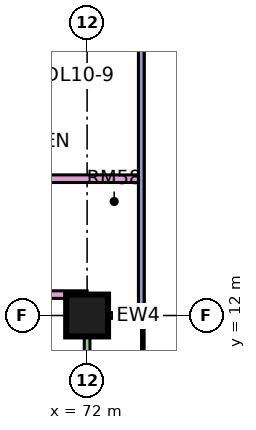
"""IFC4 building model, lengths in metres.
Left out: names, types, materials, properties, quantities, classifications, styles, units other than length and angle.
Written with IfcOpenShell. Run it as: python <this file> out.ifc"""

import sys

from ifc_helpers import new_model, si_unit, direction, frame, frame_2d, origin, origin_2d, place, context, subcontext, project, spatial, rectangle, extrude, element, save


model = new_model("IFC4")
c1 = context("Model", 3, precision=1e-05, world=origin(), true_north=direction((0.0, 1.0)))
c2 = subcontext(c1, "Body", "Model", "MODEL_VIEW")
j1 = project(units=[si_unit("LENGTHUNIT", "METRE"), si_unit("PLANEANGLEUNIT", "RADIAN")], contexts=[c1])
p1 = place(None, origin())
s1 = spatial("IfcSite", under=j1, at=p1, CompositionType="ELEMENT")
p2 = place(p1, origin())
s2 = spatial("IfcBuilding", under=s1, at=p2, CompositionType="ELEMENT")
p3 = place(p2, frame((0.0, 0.0, 52.65)))
s3 = spatial("IfcBuildingStorey", under=s2, at=p3, CompositionType="ELEMENT", Elevation=52.65)
p4 = place(p3, frame((72.0, 12.0, 0.0), z_axis=(0.0, 0.0, 1.0), x_axis=(1.0, 0.0, 0.0)))
e1 = element("IfcColumn", 1, at=p4, inside=s3, PredefinedType="COLUMN", context=c2, shape_type="SweptSolid", body=[
    extrude(rectangle(XDim=1.1, YDim=1.1, at=origin_2d()), origin(), (0.0, 0.0, 1.0), 3.75),
])
p5 = place(p3, frame((72.0, 1.575, 0.0), z_axis=(0.0, 0.0, 1.0), x_axis=(0.0, 1.0, 0.0)))
e2 = element("IfcWall", 2, at=p5, inside=s3, PredefinedType="SOLIDWALL", context=c2, shape_type="SweptSolid", body=[
    extrude(rectangle(XDim=10.35, YDim=0.15, at=frame_2d((5.175, 0.0))), origin(), (0.0, 0.0, 1.0), 3.35),
])
p6 = place(p5, frame((1.288, 0.0, 0.0)))
e3 = element("IfcOpeningElement", 3, at=p6, cuts=e2, PredefinedType="OPENING", context=c2, shape_type="SweptSolid", body=[
    extrude(rectangle(XDim=1.8, YDim=2.4, at=frame_2d((0.9, 1.2))), frame((0.0, 0.085, 0.0), z_axis=(0.0, -1.0, 0.0), x_axis=(1.0, 0.0, 0.0)), (0.0, 0.0, 1.0), 0.17),
])
p7 = place(p5, frame((6.175, 0.0, 0.45)))
e4 = element("IfcOpeningElement", 4, at=p7, cuts=e2, PredefinedType="OPENING", context=c2, shape_type="SweptSolid", body=[
    extrude(rectangle(XDim=3.0, YDim=2.4, at=frame_2d((1.5, 1.2))), frame((0.0, 0.085, 0.0), z_axis=(0.0, -1.0, 0.0), x_axis=(1.0, 0.0, 0.0)), (0.0, 0.0, 1.0), 0.17),
])
p8 = place(p3, frame((73.5, 12.0, 0.0), z_axis=(0.0, 0.0, 1.0), x_axis=(-1.0, 0.0, 0.0)))
e5 = element("IfcWall", 5, at=p8, inside=s3, PredefinedType="SOLIDWALL", context=c2, shape_type="SweptSolid", body=[
    extrude(rectangle(XDim=1.5, YDim=0.15, at=frame_2d((0.75, 0.0))), origin(), (0.0, 0.0, 1.0), 3.35),
])
p9 = place(p3, frame((73.425, 12.075, 0.0), z_axis=(0.0, 0.0, 1.0), x_axis=(0.0, 1.0, 0.0)))
e6 = element("IfcWall", 6, at=p9, inside=s3, PredefinedType="SOLIDWALL", context=c2, shape_type="SweptSolid", body=[
    extrude(rectangle(XDim=10.425, YDim=0.15, at=frame_2d((5.212, 0.0))), origin(), (0.0, 0.0, 1.0), 3.35),
])
p10 = place(p9, frame((8.025, 0.0, 0.45)))
e7 = element("IfcOpeningElement", 7, at=p10, cuts=e6, PredefinedType="OPENING", context=c2, shape_type="SweptSolid", body=[
    extrude(rectangle(XDim=1.8, YDim=2.4, at=frame_2d((0.9, 1.2))), frame((0.0, 0.085, 0.0), z_axis=(0.0, -1.0, 0.0), x_axis=(1.0, 0.0, 0.0)), (0.0, 0.0, 1.0), 0.17),
])
p11 = place(p3, frame((40.65, 12.55, 0.0), z_axis=(0.0, 0.0, 1.0), x_axis=(1.0, 0.0, 0.0)))
e8 = element("IfcWall", 8, at=p11, inside=s3, PredefinedType="PARTITIONING", context=c2, shape_type="SweptSolid", body=[
    extrude(rectangle(XDim=31.35, YDim=0.2, at=frame_2d((15.675, 0.0))), origin(), (0.0, 0.0, 1.0), 3.35),
])
p12 = place(p11, frame((24.0, 0.0, 0.0)))
e9 = element("IfcOpeningElement", 9, at=p12, cuts=e8, PredefinedType="OPENING", context=c2, shape_type="SweptSolid", body=[
    extrude(rectangle(XDim=1.0, YDim=2.1, at=frame_2d((0.5, 1.05))), frame((0.0, 0.11, 0.0), z_axis=(0.0, -1.0, 0.0), x_axis=(1.0, 0.0, 0.0)), (0.0, 0.0, 1.0), 0.22),
])
p13 = place(p11, frame((1.05, 0.0, 0.0)))
e10 = element("IfcOpeningElement", 10, at=p13, cuts=e8, PredefinedType="OPENING", context=c2, shape_type="SweptSolid", body=[
    extrude(rectangle(XDim=1.0, YDim=2.1, at=frame_2d((0.5, 1.05))), frame((0.0, 0.11, 0.0), z_axis=(0.0, -1.0, 0.0), x_axis=(1.0, 0.0, 0.0)), (0.0, 0.0, 1.0), 0.22),
])
p14 = place(p3, frame((51.225, 15.6, 0.0), z_axis=(0.0, 0.0, 1.0), x_axis=(1.0, 0.0, 0.0)))
e11 = element("IfcWall", 11, at=p14, inside=s3, PredefinedType="PARTITIONING", context=c2, shape_type="SweptSolid", body=[
    extrude(rectangle(XDim=22.125, YDim=0.2, at=frame_2d((11.062, 0.0))), origin(), (0.0, 0.0, 1.0), 3.35),
])
p15 = place(p14, frame((3.575, 0.0, 0.0)))
e12 = element("IfcOpeningElement", 12, at=p15, cuts=e11, PredefinedType="OPENING", context=c2, shape_type="SweptSolid", body=[
    extrude(rectangle(XDim=1.0, YDim=2.1, at=frame_2d((0.5, 1.05))), frame((0.0, 0.11, 0.0), z_axis=(0.0, -1.0, 0.0), x_axis=(1.0, 0.0, 0.0)), (0.0, 0.0, 1.0), 0.22),
])
p16 = place(p14, frame((0.875, 0.0, 0.0)))
e13 = element("IfcOpeningElement", 13, at=p16, cuts=e11, PredefinedType="OPENING", context=c2, shape_type="SweptSolid", body=[
    extrude(rectangle(XDim=1.0, YDim=2.1, at=frame_2d((0.5, 1.05))), frame((0.0, 0.11, 0.0), z_axis=(0.0, -1.0, 0.0), x_axis=(1.0, 0.0, 0.0)), (0.0, 0.0, 1.0), 0.22),
])
p17 = place(p3, frame((56.625, 18.3, 0.0), z_axis=(0.0, 0.0, 1.0), x_axis=(1.0, 0.0, 0.0)))
e14 = element("IfcWall", 14, at=p17, inside=s3, PredefinedType="PARTITIONING", context=c2, shape_type="SweptSolid", body=[
    extrude(rectangle(XDim=15.425, YDim=0.15, at=frame_2d((7.712, 0.0))), origin(), (0.0, 0.0, 1.0), 3.35),
])
p18 = place(p17, frame((10.275, 0.0, 0.0)))
e15 = element("IfcOpeningElement", 15, at=p18, cuts=e14, PredefinedType="OPENING", context=c2, shape_type="SweptSolid", body=[
    extrude(rectangle(XDim=0.8, YDim=2.1, at=frame_2d((0.4, 1.05))), frame((0.0, 0.085, 0.0), z_axis=(0.0, -1.0, 0.0), x_axis=(1.0, 0.0, 0.0)), (0.0, 0.0, 1.0), 0.17),
])
p19 = place(p17, frame((13.125, 0.0, 0.0)))
e16 = element("IfcOpeningElement", 16, at=p19, cuts=e14, PredefinedType="OPENING", context=c2, shape_type="SweptSolid", body=[
    extrude(rectangle(XDim=0.9, YDim=2.1, at=frame_2d((0.45, 1.05))), frame((0.0, 0.085, 0.0), z_axis=(0.0, -1.0, 0.0), x_axis=(1.0, 0.0, 0.0)), (0.0, 0.0, 1.0), 0.17),
])
p20 = place(p17, frame((7.425, 0.0, 0.0)))
e17 = element("IfcOpeningElement", 17, at=p20, cuts=e14, PredefinedType="OPENING", context=c2, shape_type="SweptSolid", body=[
    extrude(rectangle(XDim=0.8, YDim=2.1, at=frame_2d((0.4, 1.05))), frame((0.0, 0.085, 0.0), z_axis=(0.0, -1.0, 0.0), x_axis=(1.0, 0.0, 0.0)), (0.0, 0.0, 1.0), 0.17),
])
p21 = place(p17, frame((4.125, 0.0, 0.0)))
e18 = element("IfcOpeningElement", 18, at=p21, cuts=e14, PredefinedType="OPENING", context=c2, shape_type="SweptSolid", body=[
    extrude(rectangle(XDim=0.9, YDim=2.1, at=frame_2d((0.45, 1.05))), frame((0.0, 0.085, 0.0), z_axis=(0.0, -1.0, 0.0), x_axis=(1.0, 0.0, 0.0)), (0.0, 0.0, 1.0), 0.17),
])
p22 = place(p17, frame((1.125, 0.0, 0.0)))
e19 = element("IfcOpeningElement", 19, at=p22, cuts=e14, PredefinedType="OPENING", context=c2, shape_type="SweptSolid", body=[
    extrude(rectangle(XDim=0.8, YDim=2.1, at=frame_2d((0.4, 1.05))), frame((0.0, 0.085, 0.0), z_axis=(0.0, -1.0, 0.0), x_axis=(1.0, 0.0, 0.0)), (0.0, 0.0, 1.0), 0.17),
])
p23 = place(p3, frame((72.0, 18.0, 0.0), z_axis=(0.0, 0.0, 1.0), x_axis=(0.0, 1.0, 0.0)))
e20 = element("IfcWall", 20, at=p23, inside=s3, PredefinedType="PARTITIONING", context=c2, shape_type="SweptSolid", body=[
    extrude(rectangle(XDim=0.225, YDim=0.1, at=frame_2d((0.113, 0.0))), origin(), (0.0, 0.0, 1.0), 3.35),
])
save(model, sys.argv[1])
